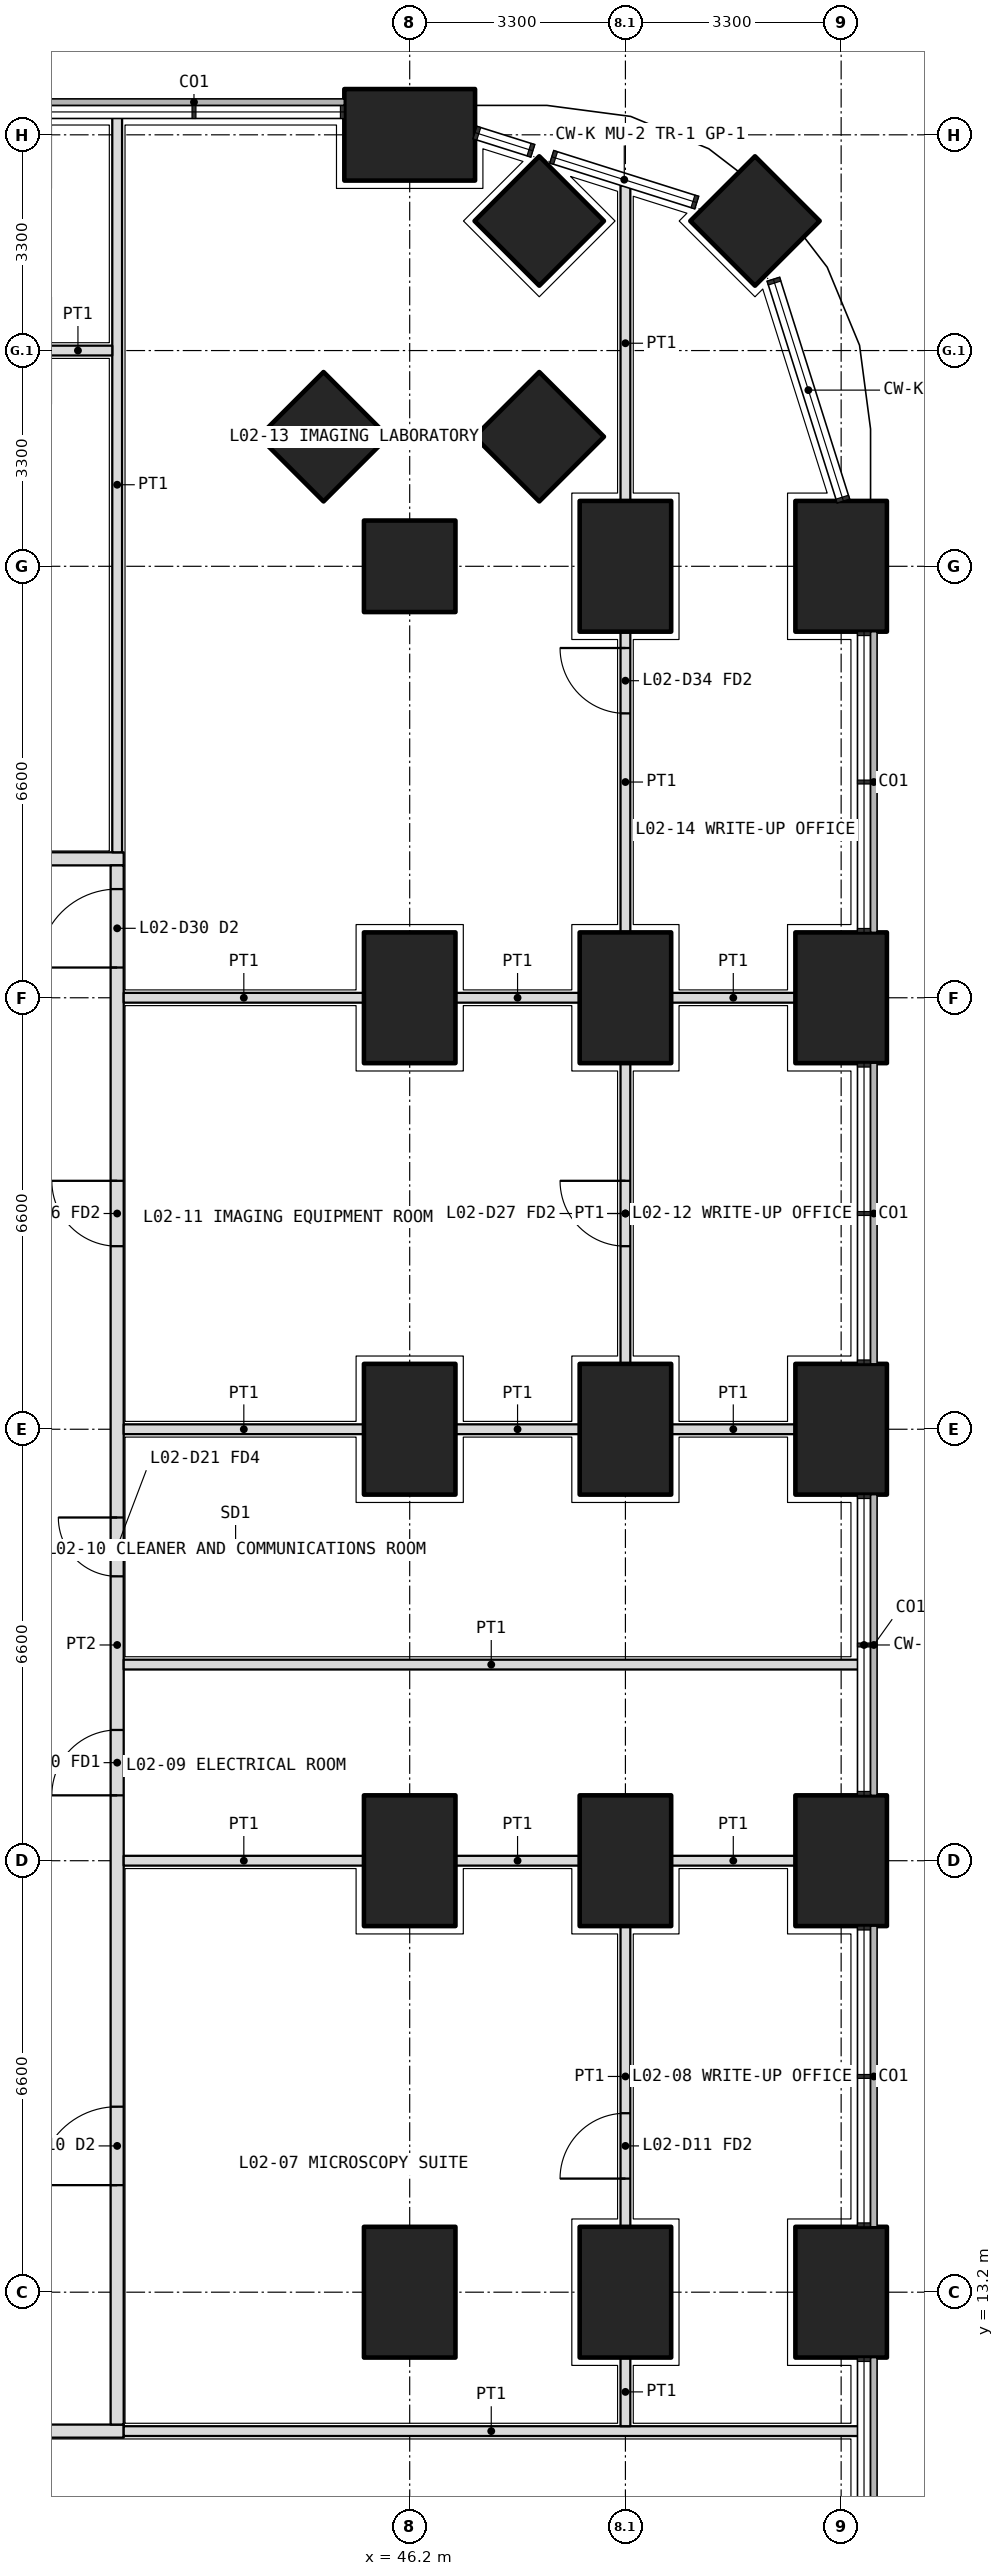
"""IFC4 building model, lengths in metres.
Left out: names, types, materials, properties, quantities, classifications, styles, units other than length and angle.
Written with IfcOpenShell. Run it as: python <this file> out.ifc"""

import sys

from ifc_helpers import new_model, si_unit, direction, frame, frame_2d, origin, origin_2d, place, context, subcontext, project, spatial, rectangle, extrude, element, fill, save


model = new_model("IFC4")
c1 = context("Model", 3, precision=1e-05, world=origin(), true_north=direction((0.0, 1.0)))
c2 = subcontext(c1, "Body", "Model", "MODEL_VIEW")
j1 = project(units=[si_unit("LENGTHUNIT", "METRE"), si_unit("PLANEANGLEUNIT", "RADIAN")], contexts=[c1])
p1 = place(None, origin())
s1 = spatial("IfcSite", under=j1, at=p1, CompositionType="ELEMENT")
p2 = place(p1, origin())
s2 = spatial("IfcBuilding", under=s1, at=p2, CompositionType="ELEMENT")
p3 = place(p2, frame((0.0, 0.0, 12.6)))
s3 = spatial("IfcBuildingStorey", under=s2, at=p3, CompositionType="ELEMENT", Elevation=12.6)
p4 = place(p3, frame((51.482, 44.882, 0.0), z_axis=(0.0, 0.0, 1.0), x_axis=(0.707106781187, 0.707106781187, 0.0)))
e1 = element("IfcColumn", 1, at=p4, inside=s3, PredefinedType="COLUMN", context=c2, shape_type="SweptSolid", body=[
    extrude(rectangle(XDim=1.4, YDim=1.4, at=origin_2d()), origin(), (0.0, 0.0, 1.0), 4.5),
])
for number, where, z_axis, x_axis in (
    (2, (52.8, 13.2, 0.0), (0.0, 0.0, 1.0), (0.0, 1.0, 0.0)),
    (3, (52.8, 19.8, 0.0), (0.0, 0.0, 1.0), (0.0, 1.0, 0.0)),
    (4, (52.8, 26.4, 0.0), (0.0, 0.0, 1.0), (0.0, 1.0, 0.0)),
    (5, (52.8, 33.0, 0.0), (0.0, 0.0, 1.0), (0.0, 1.0, 0.0)),
    (6, (52.8, 39.6, 0.0), (0.0, 0.0, 1.0), (0.0, 1.0, 0.0)),
    (7, (46.2, 46.2, 0.0), (0.0, 0.0, 1.0), (1.0, 0.0, 0.0)),
):
    element("IfcColumn", number, at=place(p3, frame(where, z_axis=z_axis, x_axis=x_axis)), inside=s3, PredefinedType="COLUMN", context=c2, shape_type="SweptSolid", body=[
        extrude(rectangle(XDim=2.0, YDim=1.4, at=origin_2d()), origin(), (0.0, 0.0, 1.0), 4.5),
    ])
for number, where, z_axis, x_axis in (
    (8, (46.2, 39.6, 0.0), (0.0, 0.0, 1.0), (1.0, 0.0, 0.0)),
    (9, (48.182, 44.882, 0.0), (0.0, 0.0, 1.0), (0.707, 0.707, 0.0)),
):
    element("IfcColumn", number, at=place(p3, frame(where, z_axis=z_axis, x_axis=x_axis)), inside=s3, PredefinedType="COLUMN", context=c2, shape_type="SweptSolid", body=[
        extrude(rectangle(XDim=1.4, YDim=1.4, at=origin_2d()), origin(), (0.0, 0.0, 1.0), 4.5),
    ])
for number, where, z_axis, x_axis in (
    (10, (49.5, 13.2, 0.0), (0.0, 0.0, 1.0), (0.0, 1.0, 0.0)),
    (11, (49.5, 19.8, 0.0), (0.0, 0.0, 1.0), (0.0, 1.0, 0.0)),
    (12, (49.5, 26.4, 0.0), (0.0, 0.0, 1.0), (0.0, 1.0, 0.0)),
    (13, (49.5, 33.0, 0.0), (0.0, 0.0, 1.0), (0.0, 1.0, 0.0)),
    (14, (49.5, 39.6, 0.0), (0.0, 0.0, 1.0), (0.0, 1.0, 0.0)),
):
    element("IfcColumn", number, at=place(p3, frame(where, z_axis=z_axis, x_axis=x_axis)), inside=s3, PredefinedType="COLUMN", context=c2, shape_type="SweptSolid", body=[
        extrude(rectangle(XDim=2.0, YDim=1.4, at=origin_2d()), origin(), (0.0, 0.0, 1.0), 4.5),
    ])
for number, where, z_axis, x_axis in (
    (15, (48.182, 41.582, 0.0), (0.0, 0.0, 1.0), (0.707, 0.707, 0.0)),
    (16, (44.882, 41.582, 0.0), (0.0, 0.0, 1.0), (0.707, 0.707, 0.0)),
):
    element("IfcColumn", number, at=place(p3, frame(where, z_axis=z_axis, x_axis=x_axis)), inside=s3, PredefinedType="COLUMN", context=c2, shape_type="SweptSolid", body=[
        extrude(rectangle(XDim=1.4, YDim=1.4, at=origin_2d()), origin(), (0.0, 0.0, 1.0), 4.5),
    ])
for number, where, z_axis, x_axis in (
    (17, (46.2, 13.2, 0.0), (0.0, 0.0, 1.0), (0.0, 1.0, 0.0)),
    (18, (46.2, 19.8, 0.0), (0.0, 0.0, 1.0), (0.0, 1.0, 0.0)),
    (19, (46.2, 26.4, 0.0), (0.0, 0.0, 1.0), (0.0, 1.0, 0.0)),
    (20, (46.2, 33.0, 0.0), (0.0, 0.0, 1.0), (0.0, 1.0, 0.0)),
):
    element("IfcColumn", number, at=place(p3, frame(where, z_axis=z_axis, x_axis=x_axis)), inside=s3, PredefinedType="COLUMN", context=c2, shape_type="SweptSolid", body=[
        extrude(rectangle(XDim=2.0, YDim=1.4, at=origin_2d()), origin(), (0.0, 0.0, 1.0), 4.5),
    ])
p5 = place(p3, frame((10.975, 11.075, 0.0), z_axis=(0.0, 0.0, 1.0), x_axis=(1.0, 0.0, 0.0)))
e21 = element("IfcWall", 21, at=p5, inside=s3, PredefinedType="PARTITIONING", context=c2, shape_type="SweptSolid", body=[
    extrude(rectangle(XDim=30.85, YDim=0.2, at=frame_2d((15.425, 0.0))), origin(), (0.0, 0.0, 1.0), 3.15),
])
p6 = place(p5, frame((3.863, 0.0, 0.0)))
e22 = element("IfcOpeningElement", 22, at=p6, cuts=e21, PredefinedType="OPENING", context=c2, shape_type="SweptSolid", body=[
    extrude(rectangle(XDim=1.2, YDim=2.1, at=frame_2d((0.6, 1.05))), frame((0.0, 0.11, 0.0), z_axis=(0.0, -1.0, 0.0), x_axis=(1.0, 0.0, 0.0)), (0.0, 0.0, 1.0), 0.22),
])
p7 = place(p5, frame((14.825, 0.0, 0.0)))
e23 = element("IfcOpeningElement", 23, at=p7, cuts=e21, PredefinedType="OPENING", context=c2, shape_type="SweptSolid", body=[
    extrude(rectangle(XDim=1.2, YDim=2.1, at=frame_2d((0.6, 1.05))), frame((0.0, 0.11, 0.0), z_axis=(0.0, -1.0, 0.0), x_axis=(1.0, 0.0, 0.0)), (0.0, 0.0, 1.0), 0.22),
])
p8 = place(p5, frame((25.788, 0.0, 0.0)))
e24 = element("IfcOpeningElement", 24, at=p8, cuts=e21, PredefinedType="OPENING", context=c2, shape_type="SweptSolid", body=[
    extrude(rectangle(XDim=1.2, YDim=2.1, at=frame_2d((0.6, 1.05))), frame((0.0, 0.11, 0.0), z_axis=(0.0, -1.0, 0.0), x_axis=(1.0, 0.0, 0.0)), (0.0, 0.0, 1.0), 0.22),
])
p9 = place(p3, frame((10.975, 35.125, 0.0), z_axis=(0.0, 0.0, 1.0), x_axis=(1.0, 0.0, 0.0)))
e25 = element("IfcWall", 25, at=p9, inside=s3, PredefinedType="PARTITIONING", context=c2, shape_type="SweptSolid", body=[
    extrude(rectangle(XDim=30.85, YDim=0.2, at=frame_2d((15.425, 0.0))), origin(), (0.0, 0.0, 1.0), 3.15),
])
p10 = place(p9, frame((3.962, 0.0, 0.0)))
e26 = element("IfcOpeningElement", 26, at=p10, cuts=e25, PredefinedType="OPENING", context=c2, shape_type="SweptSolid", body=[
    extrude(rectangle(XDim=1.0, YDim=2.1, at=frame_2d((0.5, 1.05))), frame((0.0, 0.11, 0.0), z_axis=(0.0, -1.0, 0.0), x_axis=(1.0, 0.0, 0.0)), (0.0, 0.0, 1.0), 0.22),
])
p11 = place(p9, frame((14.825, 0.0, 0.0)))
e27 = element("IfcOpeningElement", 27, at=p11, cuts=e25, PredefinedType="OPENING", context=c2, shape_type="SweptSolid", body=[
    extrude(rectangle(XDim=1.2, YDim=2.1, at=frame_2d((0.6, 1.05))), frame((0.0, 0.11, 0.0), z_axis=(0.0, -1.0, 0.0), x_axis=(1.0, 0.0, 0.0)), (0.0, 0.0, 1.0), 0.22),
])
p12 = place(p9, frame((25.788, 0.0, 0.0)))
e28 = element("IfcOpeningElement", 28, at=p12, cuts=e25, PredefinedType="OPENING", context=c2, shape_type="SweptSolid", body=[
    extrude(rectangle(XDim=1.2, YDim=2.1, at=frame_2d((0.6, 1.05))), frame((0.0, 0.11, 0.0), z_axis=(0.0, -1.0, 0.0), x_axis=(1.0, 0.0, 0.0)), (0.0, 0.0, 1.0), 0.22),
])
p13 = place(p3, frame((41.725, 11.175, 0.0), z_axis=(0.0, 0.0, 1.0), x_axis=(0.0, 1.0, 0.0)))
e29 = element("IfcWall", 29, at=p13, inside=s3, PredefinedType="PARTITIONING", context=c2, shape_type="SweptSolid", body=[
    extrude(rectangle(XDim=23.85, YDim=0.2, at=frame_2d((11.925, 0.0))), origin(), (0.0, 0.0, 1.0), 3.15),
])
p14 = place(p13, frame((3.663, 0.0, 0.0)))
e30 = element("IfcOpeningElement", 30, at=p14, cuts=e29, PredefinedType="OPENING", context=c2, shape_type="SweptSolid", body=[
    extrude(rectangle(XDim=1.2, YDim=2.1, at=frame_2d((0.6, 1.05))), frame((0.0, 0.11, 0.0), z_axis=(0.0, -1.0, 0.0), x_axis=(1.0, 0.0, 0.0)), (0.0, 0.0, 1.0), 0.22),
])
p15 = place(p13, frame((9.625, 0.0, 0.0)))
e31 = element("IfcOpeningElement", 31, at=p15, cuts=e29, PredefinedType="OPENING", context=c2, shape_type="SweptSolid", body=[
    extrude(rectangle(XDim=1.0, YDim=2.1, at=frame_2d((0.5, 1.05))), frame((0.0, 0.11, 0.0), z_axis=(0.0, -1.0, 0.0), x_axis=(1.0, 0.0, 0.0)), (0.0, 0.0, 1.0), 0.22),
])
p16 = place(p13, frame((12.975, 0.0, 0.0)))
e32 = element("IfcOpeningElement", 32, at=p16, cuts=e29, PredefinedType="OPENING", context=c2, shape_type="SweptSolid", body=[
    extrude(rectangle(XDim=0.9, YDim=2.1, at=frame_2d((0.45, 1.05))), frame((0.0, 0.11, 0.0), z_axis=(0.0, -1.0, 0.0), x_axis=(1.0, 0.0, 0.0)), (0.0, 0.0, 1.0), 0.22),
])
p17 = place(p13, frame((18.025, 0.0, 0.0)))
e33 = element("IfcOpeningElement", 33, at=p17, cuts=e29, PredefinedType="OPENING", context=c2, shape_type="SweptSolid", body=[
    extrude(rectangle(XDim=1.0, YDim=2.1, at=frame_2d((0.5, 1.05))), frame((0.0, 0.11, 0.0), z_axis=(0.0, -1.0, 0.0), x_axis=(1.0, 0.0, 0.0)), (0.0, 0.0, 1.0), 0.22),
])
p18 = place(p13, frame((22.288, 0.0, 0.0)))
e34 = element("IfcOpeningElement", 34, at=p18, cuts=e29, PredefinedType="OPENING", context=c2, shape_type="SweptSolid", body=[
    extrude(rectangle(XDim=1.2, YDim=2.1, at=frame_2d((0.6, 1.05))), frame((0.0, 0.11, 0.0), z_axis=(0.0, -1.0, 0.0), x_axis=(1.0, 0.0, 0.0)), (0.0, 0.0, 1.0), 0.22),
])
p19 = place(p3, frame((53.07, 11.075, 0.0), z_axis=(0.0, 0.0, 1.0), x_axis=(-1.0, 0.0, 0.0)))
e35 = element("IfcWall", 35, at=p19, inside=s3, PredefinedType="PARTITIONING", context=c2, shape_type="SweptSolid", body=[
    extrude(rectangle(XDim=11.245, YDim=0.15, at=frame_2d((5.623, 0.0))), origin(), (0.0, 0.0, 1.0), 3.0),
])
p20 = place(p3, frame((41.725, 46.47, 0.0), z_axis=(0.0, 0.0, 1.0), x_axis=(0.0, -1.0, 0.0)))
e36 = element("IfcWall", 36, at=p20, inside=s3, PredefinedType="PARTITIONING", context=c2, shape_type="SweptSolid", body=[
    extrude(rectangle(XDim=11.245, YDim=0.15, at=frame_2d((5.623, 0.0))), origin(), (0.0, 0.0, 1.0), 3.0),
])
p21 = place(p3, frame((49.5, 11.15, 0.0), z_axis=(0.0, 0.0, 1.0), x_axis=(0.0, 1.0, 0.0)))
e37 = element("IfcWall", 37, at=p21, inside=s3, PredefinedType="PARTITIONING", context=c2, shape_type="SweptSolid", body=[
    extrude(rectangle(XDim=1.05, YDim=0.15, at=frame_2d((0.525, 0.0))), origin(), (0.0, 0.0, 1.0), 4.2),
])
p22 = place(p3, frame((49.5, 14.2, 0.0), z_axis=(0.0, 0.0, 1.0), x_axis=(0.0, 1.0, 0.0)))
e38 = element("IfcWall", 38, at=p22, inside=s3, PredefinedType="PARTITIONING", context=c2, shape_type="SweptSolid", body=[
    extrude(rectangle(XDim=4.6, YDim=0.15, at=frame_2d((2.3, 0.0))), origin(), (0.0, 0.0, 1.0), 4.2),
])
p23 = place(p22, frame((0.738, 0.0, 0.0)))
e39 = element("IfcOpeningElement", 39, at=p23, cuts=e38, PredefinedType="OPENING", context=c2, shape_type="SweptSolid", body=[
    extrude(rectangle(XDim=1.0, YDim=2.1, at=frame_2d((0.5, 1.05))), frame((0.0, 0.085, 0.0), z_axis=(0.0, -1.0, 0.0), x_axis=(1.0, 0.0, 0.0)), (0.0, 0.0, 1.0), 0.17),
])
p24 = place(p3, frame((49.5, 27.4, 0.0), z_axis=(0.0, 0.0, 1.0), x_axis=(0.0, 1.0, 0.0)))
e40 = element("IfcWall", 40, at=p24, inside=s3, PredefinedType="PARTITIONING", context=c2, shape_type="SweptSolid", body=[
    extrude(rectangle(XDim=4.6, YDim=0.15, at=frame_2d((2.3, 0.0))), origin(), (0.0, 0.0, 1.0), 4.2),
])
p25 = place(p24, frame((1.8, 0.0, 0.0)))
e41 = element("IfcOpeningElement", 41, at=p25, cuts=e40, PredefinedType="OPENING", context=c2, shape_type="SweptSolid", body=[
    extrude(rectangle(XDim=1.0, YDim=2.1, at=frame_2d((0.5, 1.05))), frame((0.0, 0.085, 0.0), z_axis=(0.0, -1.0, 0.0), x_axis=(1.0, 0.0, 0.0)), (0.0, 0.0, 1.0), 0.17),
])
p26 = place(p3, frame((49.5, 34.0, 0.0), z_axis=(0.0, 0.0, 1.0), x_axis=(0.0, 1.0, 0.0)))
e42 = element("IfcWall", 42, at=p26, inside=s3, PredefinedType="PARTITIONING", context=c2, shape_type="SweptSolid", body=[
    extrude(rectangle(XDim=4.6, YDim=0.15, at=frame_2d((2.3, 0.0))), origin(), (0.0, 0.0, 1.0), 4.2),
])
p27 = place(p26, frame((3.35, 0.0, 0.0)))
e43 = element("IfcOpeningElement", 43, at=p27, cuts=e42, PredefinedType="OPENING", context=c2, shape_type="SweptSolid", body=[
    extrude(rectangle(XDim=1.0, YDim=2.1, at=frame_2d((0.5, 1.05))), frame((0.0, 0.085, 0.0), z_axis=(0.0, -1.0, 0.0), x_axis=(1.0, 0.0, 0.0)), (0.0, 0.0, 1.0), 0.17),
])
p28 = place(p3, frame((49.5, 40.6, 0.0), z_axis=(0.0, 0.0, 1.0), x_axis=(0.0, 1.0, 0.0)))
e44 = element("IfcWall", 44, at=p28, inside=s3, PredefinedType="PARTITIONING", context=c2, shape_type="SweptSolid", body=[
    extrude(rectangle(XDim=4.824, YDim=0.15, at=frame_2d((2.412, 0.0))), origin(), (0.0, 0.0, 1.0), 3.0),
])
p29 = place(p3, frame((53.07, 22.8, 0.0), z_axis=(0.0, 0.0, 1.0), x_axis=(-1.0, 0.0, 0.0)))
e45 = element("IfcWall", 45, at=p29, inside=s3, PredefinedType="PARTITIONING", context=c2, shape_type="SweptSolid", body=[
    extrude(rectangle(XDim=11.245, YDim=0.15, at=frame_2d((5.623, 0.0))), origin(), (0.0, 0.0, 1.0), 3.0),
])
for number, where, z_axis, x_axis in (
    (46, (52.1, 26.4, 0.0), (0.0, 0.0, 1.0), (-1.0, 0.0, 0.0)),
    (47, (48.8, 26.4, 0.0), (0.0, 0.0, 1.0), (-1.0, 0.0, 0.0)),
):
    element("IfcWall", number, at=place(p3, frame(where, z_axis=z_axis, x_axis=x_axis)), inside=s3, PredefinedType="PARTITIONING", context=c2, shape_type="SweptSolid", body=[
        extrude(rectangle(XDim=1.9, YDim=0.15, at=frame_2d((0.95, 0.0))), origin(), (0.0, 0.0, 1.0), 3.15),
    ])
p30 = place(p3, frame((45.5, 26.4, 0.0), z_axis=(0.0, 0.0, 1.0), x_axis=(-1.0, 0.0, 0.0)))
e48 = element("IfcWall", 48, at=p30, inside=s3, PredefinedType="PARTITIONING", context=c2, shape_type="SweptSolid", body=[
    extrude(rectangle(XDim=3.675, YDim=0.15, at=frame_2d((1.837, 0.0))), origin(), (0.0, 0.0, 1.0), 3.15),
])
for number, where, z_axis, x_axis in (
    (49, (52.1, 19.8, 0.0), (0.0, 0.0, 1.0), (-1.0, 0.0, 0.0)),
    (50, (48.8, 19.8, 0.0), (0.0, 0.0, 1.0), (-1.0, 0.0, 0.0)),
):
    element("IfcWall", number, at=place(p3, frame(where, z_axis=z_axis, x_axis=x_axis)), inside=s3, PredefinedType="PARTITIONING", context=c2, shape_type="SweptSolid", body=[
        extrude(rectangle(XDim=1.9, YDim=0.15, at=frame_2d((0.95, 0.0))), origin(), (0.0, 0.0, 1.0), 3.15),
    ])
p31 = place(p3, frame((45.5, 19.8, 0.0), z_axis=(0.0, 0.0, 1.0), x_axis=(-1.0, 0.0, 0.0)))
e51 = element("IfcWall", 51, at=p31, inside=s3, PredefinedType="PARTITIONING", context=c2, shape_type="SweptSolid", body=[
    extrude(rectangle(XDim=3.675, YDim=0.15, at=frame_2d((1.837, 0.0))), origin(), (0.0, 0.0, 1.0), 3.15),
])
for number, where, z_axis, x_axis in (
    (52, (52.1, 33.0, 0.0), (0.0, 0.0, 1.0), (-1.0, 0.0, 0.0)),
    (53, (48.8, 33.0, 0.0), (0.0, 0.0, 1.0), (-1.0, 0.0, 0.0)),
):
    element("IfcWall", number, at=place(p3, frame(where, z_axis=z_axis, x_axis=x_axis)), inside=s3, PredefinedType="PARTITIONING", context=c2, shape_type="SweptSolid", body=[
        extrude(rectangle(XDim=1.9, YDim=0.15, at=frame_2d((0.95, 0.0))), origin(), (0.0, 0.0, 1.0), 3.15),
    ])
p32 = place(p3, frame((45.5, 33.0, 0.0), z_axis=(0.0, 0.0, 1.0), x_axis=(-1.0, 0.0, 0.0)))
e54 = element("IfcWall", 54, at=p32, inside=s3, PredefinedType="PARTITIONING", context=c2, shape_type="SweptSolid", body=[
    extrude(rectangle(XDim=3.675, YDim=0.15, at=frame_2d((1.837, 0.0))), origin(), (0.0, 0.0, 1.0), 3.15),
])
p33 = place(p3, frame((41.65, 42.9, 0.0), z_axis=(0.0, 0.0, 1.0), x_axis=(-1.0, 0.0, 0.0)))
e55 = element("IfcWall", 55, at=p33, inside=s3, PredefinedType="PARTITIONING", context=c2, shape_type="SweptSolid", body=[
    extrude(rectangle(XDim=1.05, YDim=0.15, at=frame_2d((0.525, 0.0))), origin(), (0.0, 0.0, 1.0), 4.2),
])
p34 = place(p14, origin())
e56 = element("IfcDoor", 56, at=p34, inside=s3, OperationType="DOUBLE_DOOR_SINGLE_SWING", PredefinedType="DOOR", context=c2, shape_type="SweptSolid", body=[
    extrude(rectangle(XDim=1.2, YDim=2.1, at=frame_2d((0.6, 1.05))), frame((0.0, 0.025, 0.0), z_axis=(0.0, -1.0, 0.0), x_axis=(1.0, 0.0, 0.0)), (0.0, 0.0, 1.0), 0.05),
])
fill(e30, e56)
p35 = place(p23, origin())
e57 = element("IfcDoor", 57, at=p35, inside=s3, OperationType="SINGLE_SWING_LEFT", PredefinedType="DOOR", context=c2, shape_type="SweptSolid", body=[
    extrude(rectangle(XDim=1.0, YDim=2.1, at=frame_2d((0.5, 1.05))), frame((0.0, 0.025, 0.0), z_axis=(0.0, -1.0, 0.0), x_axis=(1.0, 0.0, 0.0)), (0.0, 0.0, 1.0), 0.05),
])
fill(e39, e57)
p36 = place(p15, origin())
e58 = element("IfcDoor", 58, at=p36, inside=s3, OperationType="SINGLE_SWING_LEFT", PredefinedType="DOOR", context=c2, shape_type="SweptSolid", body=[
    extrude(rectangle(XDim=1.0, YDim=2.1, at=frame_2d((0.5, 1.05))), frame((0.0, 0.025, 0.0), z_axis=(0.0, -1.0, 0.0), x_axis=(1.0, 0.0, 0.0)), (0.0, 0.0, 1.0), 0.05),
])
fill(e31, e58)
p37 = place(p16, origin())
e59 = element("IfcDoor", 59, at=p37, inside=s3, OperationType="SINGLE_SWING_RIGHT", PredefinedType="DOOR", context=c2, shape_type="SweptSolid", body=[
    extrude(rectangle(XDim=0.9, YDim=2.1, at=frame_2d((0.45, 1.05))), frame((0.0, 0.025, 0.0), z_axis=(0.0, -1.0, 0.0), x_axis=(1.0, 0.0, 0.0)), (0.0, 0.0, 1.0), 0.05),
])
fill(e32, e59)
p38 = place(p17, origin())
e60 = element("IfcDoor", 60, at=p38, inside=s3, OperationType="SINGLE_SWING_RIGHT", PredefinedType="DOOR", context=c2, shape_type="SweptSolid", body=[
    extrude(rectangle(XDim=1.0, YDim=2.1, at=frame_2d((0.5, 1.05))), frame((0.0, 0.025, 0.0), z_axis=(0.0, -1.0, 0.0), x_axis=(1.0, 0.0, 0.0)), (0.0, 0.0, 1.0), 0.05),
])
fill(e33, e60)
p39 = place(p25, origin())
e61 = element("IfcDoor", 61, at=p39, inside=s3, OperationType="SINGLE_SWING_RIGHT", PredefinedType="DOOR", context=c2, shape_type="SweptSolid", body=[
    extrude(rectangle(XDim=1.0, YDim=2.1, at=frame_2d((0.5, 1.05))), frame((0.0, 0.025, 0.0), z_axis=(0.0, -1.0, 0.0), x_axis=(1.0, 0.0, 0.0)), (0.0, 0.0, 1.0), 0.05),
])
fill(e41, e61)
p40 = place(p18, origin())
e62 = element("IfcDoor", 62, at=p40, inside=s3, OperationType="DOUBLE_DOOR_SINGLE_SWING", PredefinedType="DOOR", context=c2, shape_type="SweptSolid", body=[
    extrude(rectangle(XDim=1.2, YDim=2.1, at=frame_2d((0.6, 1.05))), frame((0.0, 0.025, 0.0), z_axis=(0.0, -1.0, 0.0), x_axis=(1.0, 0.0, 0.0)), (0.0, 0.0, 1.0), 0.05),
])
fill(e34, e62)
p41 = place(p27, origin())
e63 = element("IfcDoor", 63, at=p41, inside=s3, OperationType="SINGLE_SWING_RIGHT", PredefinedType="DOOR", context=c2, shape_type="SweptSolid", body=[
    extrude(rectangle(XDim=1.0, YDim=2.1, at=frame_2d((0.5, 1.05))), frame((0.0, 0.025, 0.0), z_axis=(0.0, -1.0, 0.0), x_axis=(1.0, 0.0, 0.0)), (0.0, 0.0, 1.0), 0.05),
])
fill(e43, e63)
save(model, sys.argv[1])
